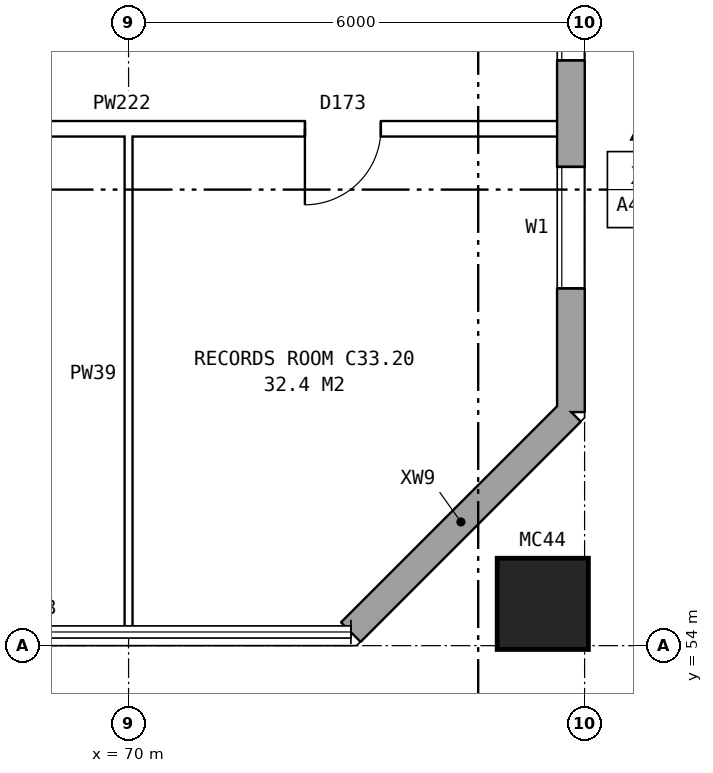
"""IFC4 building model, lengths in metres.
Left out: names, types, materials, properties, quantities, classifications, styles, units other than length and angle.
Written with IfcOpenShell. Run it as: python <this file> out.ifc"""

import sys

from ifc_helpers import new_model, si_unit, direction, frame, frame_2d, origin, origin_2d, place, context, subcontext, project, spatial, rectangle, hollow_rectangle, extrude, element, fill, save


model = new_model("IFC4")
c1 = context("Model", 3, precision=1e-05, world=origin(), true_north=direction((0.0, 1.0)))
c2 = subcontext(c1, "Body", "Model", "MODEL_VIEW")
j1 = project(units=[si_unit("LENGTHUNIT", "METRE"), si_unit("PLANEANGLEUNIT", "RADIAN")], contexts=[c1])
p1 = place(None, origin())
s1 = spatial("IfcSite", under=j1, at=p1, CompositionType="ELEMENT")
p2 = place(p1, origin())
s2 = spatial("IfcBuilding", under=s1, at=p2, CompositionType="ELEMENT")
p3 = place(p2, frame((0.0, 0.0, 119.5)))
s3 = spatial("IfcBuildingStorey", under=s2, at=p3, CompositionType="ELEMENT", Elevation=119.5)
p4 = place(p3, frame((75.45, 54.55, 0.0), z_axis=(0.0, 0.0, 1.0), x_axis=(1.0, 0.0, 0.0)))
e1 = element("IfcColumn", 1, at=p4, inside=s3, PredefinedType="COLUMN", context=c2, shape_type="SweptSolid", body=[
    extrude(hollow_rectangle(XDim=1.2, YDim=1.2, WallThickness=0.065, at=origin_2d()), origin(), (0.0, 0.0, 1.0), 4.2),
])
p5 = place(p3, frame((72.925, 54.18, 0.0), z_axis=(0.0, 0.0, 1.0), x_axis=(0.707106781187, 0.707106781187, 0.0)))
e2 = element("IfcWall", 2, at=p5, inside=s3, PredefinedType="STANDARD", context=c2, shape_type="SweptSolid", body=[
    extrude(rectangle(XDim=4.094, YDim=0.36, at=frame_2d((2.047, 0.0))), origin(), (0.0, 0.0, 1.0), 3.6),
])
p6 = place(p3, frame((75.82, 57.075, 0.0), z_axis=(0.0, 0.0, 1.0), x_axis=(0.0, 1.0, 0.0)))
e3 = element("IfcWall", 3, at=p6, inside=s3, PredefinedType="STANDARD", context=c2, shape_type="SweptSolid", body=[
    extrude(rectangle(XDim=25.851, YDim=0.36, at=frame_2d((12.925, 0.0))), origin(), (0.0, 0.0, 1.0), 3.6),
])
p7 = place(p6, frame((1.625, 0.0, 0.8)))
e4 = element("IfcOpeningElement", 4, at=p7, cuts=e3, PredefinedType="OPENING", context=c2, shape_type="SweptSolid", body=[
    extrude(rectangle(XDim=1.6, YDim=1.8, at=frame_2d((0.8, 0.9))), frame((0.0, 0.19, 0.0), z_axis=(0.0, -1.0, 0.0), x_axis=(1.0, 0.0, 0.0)), (0.0, 0.0, 1.0), 0.38),
])
p8 = place(p6, frame((4.625, 0.0, 0.8)))
e5 = element("IfcOpeningElement", 5, at=p8, cuts=e3, PredefinedType="OPENING", context=c2, shape_type="SweptSolid", body=[
    extrude(rectangle(XDim=1.6, YDim=1.8, at=frame_2d((0.8, 0.9))), frame((0.0, 0.19, 0.0), z_axis=(0.0, -1.0, 0.0), x_axis=(1.0, 0.0, 0.0)), (0.0, 0.0, 1.0), 0.38),
])
p9 = place(p6, frame((19.625, 0.0, 0.8)))
e6 = element("IfcOpeningElement", 6, at=p9, cuts=e3, PredefinedType="OPENING", context=c2, shape_type="SweptSolid", body=[
    extrude(rectangle(XDim=1.6, YDim=1.8, at=frame_2d((0.8, 0.9))), frame((0.0, 0.19, 0.0), z_axis=(0.0, -1.0, 0.0), x_axis=(1.0, 0.0, 0.0)), (0.0, 0.0, 1.0), 0.38),
])
p10 = place(p6, frame((22.625, 0.0, 0.8)))
e7 = element("IfcOpeningElement", 7, at=p10, cuts=e3, PredefinedType="OPENING", context=c2, shape_type="SweptSolid", body=[
    extrude(rectangle(XDim=1.6, YDim=1.8, at=frame_2d((0.8, 0.9))), frame((0.0, 0.19, 0.0), z_axis=(0.0, -1.0, 0.0), x_axis=(1.0, 0.0, 0.0)), (0.0, 0.0, 1.0), 0.38),
])
p11 = place(p3, frame((63.54, 60.8, 0.0), z_axis=(0.0, 0.0, 1.0), x_axis=(1.0, 0.0, 0.0)))
e8 = element("IfcWall", 8, at=p11, inside=s3, PredefinedType="PARTITIONING", context=c2, shape_type="SweptSolid", body=[
    extrude(rectangle(XDim=12.22, YDim=0.2, at=frame_2d((6.11, 0.0))), origin(), (0.0, 0.0, 1.0), 3.6),
])
p12 = place(p11, frame((2.96, 0.0, 0.0)))
e9 = element("IfcOpeningElement", 9, at=p12, cuts=e8, PredefinedType="OPENING", context=c2, shape_type="SweptSolid", body=[
    extrude(rectangle(XDim=1.0, YDim=2.1, at=frame_2d((0.5, 1.05))), frame((0.0, 0.11, 0.0), z_axis=(0.0, -1.0, 0.0), x_axis=(1.0, 0.0, 0.0)), (0.0, 0.0, 1.0), 0.22),
])
p13 = place(p11, frame((8.78, 0.0, 0.0)))
e10 = element("IfcOpeningElement", 10, at=p13, cuts=e8, PredefinedType="OPENING", context=c2, shape_type="SweptSolid", body=[
    extrude(rectangle(XDim=1.0, YDim=2.1, at=frame_2d((0.5, 1.05))), frame((0.0, 0.11, 0.0), z_axis=(0.0, -1.0, 0.0), x_axis=(1.0, 0.0, 0.0)), (0.0, 0.0, 1.0), 0.22),
])
p14 = place(p3, frame((70.0, 54.24, 0.0), z_axis=(0.0, 0.0, 1.0), x_axis=(0.0, 1.0, 0.0)))
e11 = element("IfcWall", 11, at=p14, inside=s3, PredefinedType="PARTITIONING", context=c2, shape_type="SweptSolid", body=[
    extrude(rectangle(XDim=6.66, YDim=0.1, at=frame_2d((3.33, 0.0))), origin(), (0.0, 0.0, 1.0), 3.6),
])
p15 = place(p7, origin())
e12 = element("IfcWindow", 12, at=p15, inside=s3, PartitioningType="SINGLE_PANEL", PredefinedType="WINDOW", context=c2, shape_type="SweptSolid", body=[
    extrude(rectangle(XDim=1.6, YDim=1.8, at=frame_2d((0.8, 0.9))), frame((0.0, 0.15, 0.0), z_axis=(0.0, -1.0, 0.0), x_axis=(1.0, 0.0, 0.0)), (0.0, 0.0, 1.0), 0.06),
])
fill(e4, e12)
p16 = place(p8, origin())
e13 = element("IfcWindow", 13, at=p16, inside=s3, PartitioningType="SINGLE_PANEL", PredefinedType="WINDOW", context=c2, shape_type="SweptSolid", body=[
    extrude(rectangle(XDim=1.6, YDim=1.8, at=frame_2d((0.8, 0.9))), frame((0.0, 0.15, 0.0), z_axis=(0.0, -1.0, 0.0), x_axis=(1.0, 0.0, 0.0)), (0.0, 0.0, 1.0), 0.06),
])
fill(e5, e13)
p17 = place(p13, frame((1.0, 0.0, 0.0), z_axis=(0.0, 0.0, 1.0), x_axis=(-1.0, 0.0, 0.0)))
e14 = element("IfcDoor", 14, at=p17, inside=s3, OperationType="SINGLE_SWING_RIGHT", PredefinedType="DOOR", context=c2, shape_type="SweptSolid", body=[
    extrude(rectangle(XDim=1.0, YDim=2.1, at=frame_2d((0.5, 1.05))), frame((0.0, 0.025, 0.0), z_axis=(0.0, -1.0, 0.0), x_axis=(1.0, 0.0, 0.0)), (0.0, 0.0, 1.0), 0.05),
])
fill(e10, e14)
save(model, sys.argv[1])
